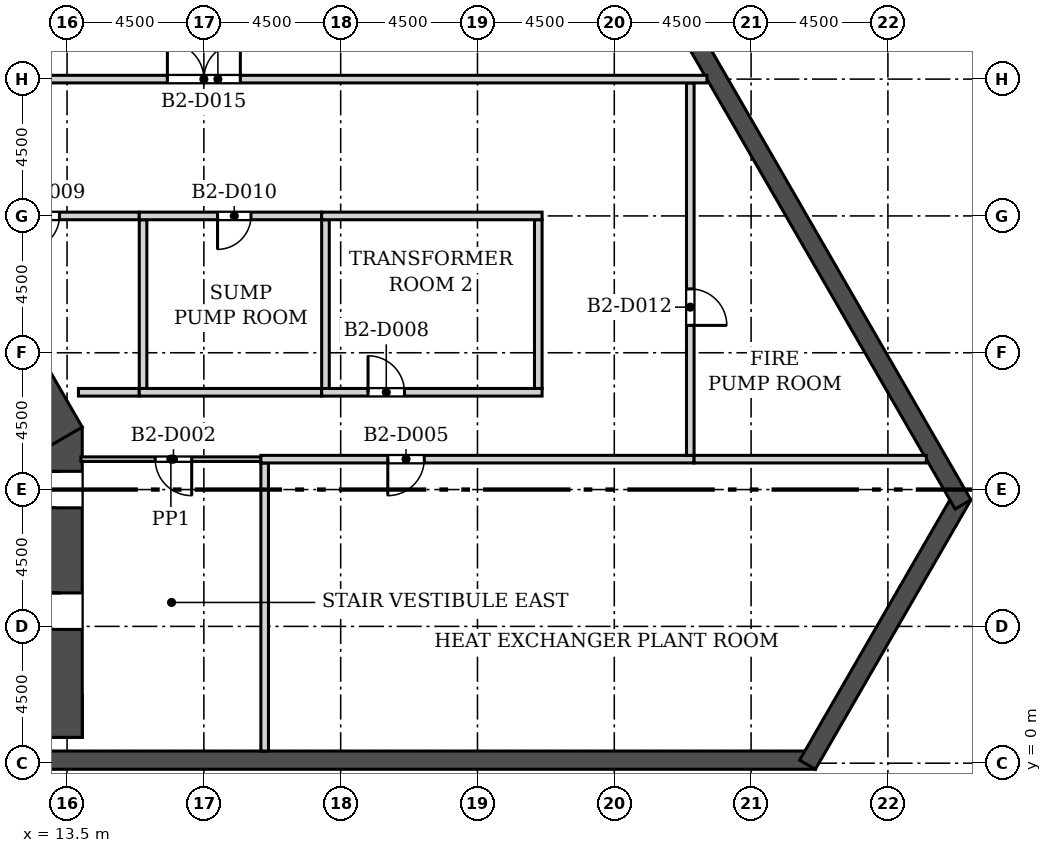
"""IFC4 building model, lengths in metres.
Left out: names, types, materials, properties, quantities, classifications, styles, units other than length and angle.
Written with IfcOpenShell. Run it as: python <this file> out.ifc"""

import sys

from ifc_helpers import new_model, si_unit, direction, frame, frame_2d, origin, place, context, subcontext, project, spatial, rectangle, extrude, element, fill, save


model = new_model("IFC4")
c1 = context("Model", 3, precision=1e-05, world=origin(), true_north=direction((0.0, 1.0)))
c2 = subcontext(c1, "Body", "Model", "MODEL_VIEW")
j1 = project(units=[si_unit("LENGTHUNIT", "METRE"), si_unit("PLANEANGLEUNIT", "RADIAN")], contexts=[c1])
p1 = place(None, origin())
s1 = spatial("IfcSite", under=j1, at=p1, CompositionType="ELEMENT")
p2 = place(p1, origin())
s2 = spatial("IfcBuilding", under=s1, at=p2, CompositionType="ELEMENT")
p3 = place(p2, frame((0.0, 0.0, -14.0)))
s3 = spatial("IfcBuildingStorey", under=s2, at=p3, CompositionType="ELEMENT", Elevation=-14.0)
p4 = place(p3, frame((-38.115, 0.1, -0.4), z_axis=(0.0, 0.0, 1.0), x_axis=(1.0, 0.0, 0.0)))
e1 = element("IfcWall", 1, at=p4, inside=s3, PredefinedType="SOLIDWALL", context=c2, shape_type="SweptSolid", body=[
    extrude(rectangle(XDim=76.231, YDim=0.6, at=frame_2d((38.115, 0.0))), origin(), (0.0, 0.0, 1.0), 6.4),
])
p5 = place(p3, frame((37.856, -0.05, -0.4), z_axis=(0.0, 0.0, 1.0), x_axis=(0.499996492717, 0.866027428706, 0.0)))
e2 = element("IfcWall", 2, at=p5, inside=s3, PredefinedType="SOLIDWALL", context=c2, shape_type="SweptSolid", body=[
    extrude(rectangle(XDim=10.231, YDim=0.6, at=frame_2d((5.115, 0.0))), origin(), (0.0, 0.0, 1.0), 6.4),
])
p6 = place(p3, frame((42.971, 8.51, -0.4), z_axis=(0.0, 0.0, 1.0), x_axis=(-0.499999312333, 0.866025800809, 0.0)))
e3 = element("IfcWall", 3, at=p6, inside=s3, PredefinedType="SOLIDWALL", context=c2, shape_type="SweptSolid", body=[
    extrude(rectangle(XDim=76.231, YDim=0.6, at=frame_2d((38.115, 0.0))), origin(), (0.0, 0.0, 1.0), 6.4),
])
p7 = place(p3, frame((-14.0, 1.55, 0.0), z_axis=(0.0, 0.0, 1.0), x_axis=(1.0, 0.0, 0.0)))
e4 = element("IfcWall", 4, at=p7, inside=s3, PredefinedType="SHEAR", context=c2, shape_type="SweptSolid", body=[
    extrude(rectangle(XDim=28.0, YDim=1.4, at=frame_2d((14.0, 0.0))), origin(), (0.0, 0.0, 1.0), 6.0),
])
p8 = place(p3, frame((13.3, 0.85, 0.0), z_axis=(0.0, 0.0, 1.0), x_axis=(0.0, 1.0, 0.0)))
e5 = element("IfcWall", 5, at=p8, inside=s3, PredefinedType="SHEAR", context=c2, shape_type="SweptSolid", body=[
    extrude(rectangle(XDim=10.202, YDim=1.4, at=frame_2d((5.101, 0.0))), origin(), (0.0, 0.0, 1.0), 6.0),
])
p9 = place(p8, frame((3.55, 0.0, 0.0)))
e6 = element("IfcOpeningElement", 6, at=p9, cuts=e5, PredefinedType="OPENING", context=c2, shape_type="SweptSolid", body=[
    extrude(rectangle(XDim=1.2, YDim=2.1, at=frame_2d((0.6, 1.05))), frame((0.0, 0.71, 0.0), z_axis=(0.0, -1.0, 0.0), x_axis=(1.0, 0.0, 0.0)), (0.0, 0.0, 1.0), 1.42),
])
p10 = place(p8, frame((7.55, 0.0, 0.0)))
e7 = element("IfcOpeningElement", 7, at=p10, cuts=e5, PredefinedType="OPENING", context=c2, shape_type="SweptSolid", body=[
    extrude(rectangle(XDim=1.2, YDim=2.1, at=frame_2d((0.6, 1.05))), frame((0.0, 0.71, 0.0), z_axis=(0.0, -1.0, 0.0), x_axis=(1.0, 0.0, 0.0)), (0.0, 0.0, 1.0), 1.42),
])
p11 = place(p3, frame((13.394, 10.703, 0.0), z_axis=(0.0, 0.0, 1.0), x_axis=(-0.50000187635, 0.866024320471, 0.0)))
e8 = element("IfcWall", 8, at=p11, inside=s3, PredefinedType="SHEAR", context=c2, shape_type="SweptSolid", body=[
    extrude(rectangle(XDim=9.177, YDim=1.4, at=frame_2d((4.588, 0.0))), origin(), (0.0, 0.0, 1.0), 6.0),
])
p12 = place(p3, frame((20.0, 9.875, 0.0), z_axis=(0.0, 0.0, 1.0), x_axis=(0.0, -1.0, 0.0)))
e9 = element("IfcWall", 9, at=p12, inside=s3, PredefinedType="SOLIDWALL", context=c2, shape_type="SweptSolid", body=[
    extrude(rectangle(XDim=9.475, YDim=0.25, at=frame_2d((4.738, 0.0))), origin(), (0.0, 0.0, 1.0), 5.65),
])
p13 = place(p3, frame((13.955, 10.0, 0.0), z_axis=(0.0, 0.0, 1.0), x_axis=(1.0, 0.0, 0.0)))
e10 = element("IfcWall", 10, at=p13, inside=s3, PredefinedType="PARTITIONING", context=c2, shape_type="SweptSolid", body=[
    extrude(rectangle(XDim=5.92, YDim=0.15, at=frame_2d((2.96, 0.0))), origin(), (0.0, 0.0, 1.0), 5.65),
])
p14 = place(p13, frame((2.445, 0.0, 0.0)))
e11 = element("IfcOpeningElement", 11, at=p14, cuts=e10, PredefinedType="OPENING", context=c2, shape_type="SweptSolid", body=[
    extrude(rectangle(XDim=1.2, YDim=2.1, at=frame_2d((0.6, 1.05))), frame((0.0, 0.085, 0.0), z_axis=(0.0, -1.0, 0.0), x_axis=(1.0, 0.0, 0.0)), (0.0, 0.0, 1.0), 0.17),
])
p15 = place(p3, frame((34.125, 10.0, 0.0), z_axis=(0.0, 0.0, 1.0), x_axis=(-1.0, 0.0, 0.0)))
e12 = element("IfcWall", 12, at=p15, inside=s3, PredefinedType="SOLIDWALL", context=c2, shape_type="SweptSolid", body=[
    extrude(rectangle(XDim=14.25, YDim=0.25, at=frame_2d((7.125, 0.0))), origin(), (0.0, 0.0, 1.0), 5.65),
])
p16 = place(p15, frame((8.875, 0.0, 0.0)))
e13 = element("IfcOpeningElement", 13, at=p16, cuts=e12, PredefinedType="OPENING", context=c2, shape_type="SweptSolid", body=[
    extrude(rectangle(XDim=1.2, YDim=2.1, at=frame_2d((0.6, 1.05))), frame((0.0, 0.135, 0.0), z_axis=(0.0, -1.0, 0.0), x_axis=(1.0, 0.0, 0.0)), (0.0, 0.0, 1.0), 0.27),
])
p17 = place(p3, frame((34.125, 10.0, 0.0), z_axis=(0.0, 0.0, 1.0), x_axis=(1.0, 0.0, 0.0)))
e14 = element("IfcWall", 14, at=p17, inside=s3, PredefinedType="SOLIDWALL", context=c2, shape_type="SweptSolid", body=[
    extrude(rectangle(XDim=7.64, YDim=0.25, at=frame_2d((3.82, 0.0))), origin(), (0.0, 0.0, 1.0), 5.65),
])
p18 = place(p3, frame((13.875, 12.2, 0.0), z_axis=(0.0, 0.0, 1.0), x_axis=(1.0, 0.0, 0.0)))
e15 = element("IfcWall", 15, at=p18, inside=s3, PredefinedType="SOLIDWALL", context=c2, shape_type="SweptSolid", body=[
    extrude(rectangle(XDim=2.0, YDim=0.25, at=frame_2d((1.0, 0.0))), origin(), (0.0, 0.0, 1.0), 5.65),
])
p19 = place(p3, frame((15.875, 12.2, 0.0), z_axis=(0.0, 0.0, 1.0), x_axis=(1.0, 0.0, 0.0)))
e16 = element("IfcWall", 16, at=p19, inside=s3, PredefinedType="SOLIDWALL", context=c2, shape_type="SweptSolid", body=[
    extrude(rectangle(XDim=6.0, YDim=0.25, at=frame_2d((3.0, 0.0))), origin(), (0.0, 0.0, 1.0), 5.65),
])
p20 = place(p3, frame((21.875, 12.2, 0.0), z_axis=(0.0, 0.0, 1.0), x_axis=(1.0, 0.0, 0.0)))
e17 = element("IfcWall", 17, at=p20, inside=s3, PredefinedType="SOLIDWALL", context=c2, shape_type="SweptSolid", body=[
    extrude(rectangle(XDim=7.25, YDim=0.25, at=frame_2d((3.625, 0.0))), origin(), (0.0, 0.0, 1.0), 5.65),
])
p21 = place(p20, frame((1.525, 0.0, 0.0)))
e18 = element("IfcOpeningElement", 18, at=p21, cuts=e17, PredefinedType="OPENING", context=c2, shape_type="SweptSolid", body=[
    extrude(rectangle(XDim=1.2, YDim=2.1, at=frame_2d((0.6, 1.05))), frame((0.0, 0.135, 0.0), z_axis=(0.0, -1.0, 0.0), x_axis=(1.0, 0.0, 0.0)), (0.0, 0.0, 1.0), 0.27),
])
for number, where, z_axis, x_axis in (
    (19, (22.0, 12.325, 0.0), (0.0, 0.0, 1.0), (0.0, 1.0, 0.0)),
    (20, (29.0, 12.325, 0.0), (0.0, 0.0, 1.0), (0.0, 1.0, 0.0)),
    (21, (16.0, 17.875, 0.0), (0.0, 0.0, 1.0), (0.0, -1.0, 0.0)),
):
    element("IfcWall", number, at=place(p3, frame(where, z_axis=z_axis, x_axis=x_axis)), inside=s3, PredefinedType="SOLIDWALL", context=c2, shape_type="SweptSolid", body=[
        extrude(rectangle(XDim=5.55, YDim=0.25, at=frame_2d((2.775, 0.0))), origin(), (0.0, 0.0, 1.0), 5.65),
    ])
p22 = place(p3, frame((15.875, 18.0, 0.0), z_axis=(0.0, 0.0, 1.0), x_axis=(-1.0, 0.0, 0.0)))
e22 = element("IfcWall", 22, at=p22, inside=s3, PredefinedType="SOLIDWALL", context=c2, shape_type="SweptSolid", body=[
    extrude(rectangle(XDim=5.977, YDim=0.25, at=frame_2d((2.988, 0.0))), origin(), (0.0, 0.0, 1.0), 5.65),
])
p23 = place(p22, frame((2.625, 0.0, 0.0)))
e23 = element("IfcOpeningElement", 23, at=p23, cuts=e22, PredefinedType="OPENING", context=c2, shape_type="SweptSolid", body=[
    extrude(rectangle(XDim=1.1, YDim=2.1, at=frame_2d((0.55, 1.05))), frame((0.0, 0.135, 0.0), z_axis=(0.0, -1.0, 0.0), x_axis=(1.0, 0.0, 0.0)), (0.0, 0.0, 1.0), 0.27),
])
p24 = place(p3, frame((21.875, 18.0, 0.0), z_axis=(0.0, 0.0, 1.0), x_axis=(-1.0, 0.0, 0.0)))
e24 = element("IfcWall", 24, at=p24, inside=s3, PredefinedType="SOLIDWALL", context=c2, shape_type="SweptSolid", body=[
    extrude(rectangle(XDim=6.0, YDim=0.25, at=frame_2d((3.0, 0.0))), origin(), (0.0, 0.0, 1.0), 5.65),
])
p25 = place(p24, frame((2.325, 0.0, 0.0)))
e25 = element("IfcOpeningElement", 25, at=p25, cuts=e24, PredefinedType="OPENING", context=c2, shape_type="SweptSolid", body=[
    extrude(rectangle(XDim=1.1, YDim=2.1, at=frame_2d((0.55, 1.05))), frame((0.0, 0.135, 0.0), z_axis=(0.0, -1.0, 0.0), x_axis=(1.0, 0.0, 0.0)), (0.0, 0.0, 1.0), 0.27),
])
p26 = place(p3, frame((29.125, 18.0, 0.0), z_axis=(0.0, 0.0, 1.0), x_axis=(-1.0, 0.0, 0.0)))
e26 = element("IfcWall", 26, at=p26, inside=s3, PredefinedType="SOLIDWALL", context=c2, shape_type="SweptSolid", body=[
    extrude(rectangle(XDim=7.25, YDim=0.25, at=frame_2d((3.625, 0.0))), origin(), (0.0, 0.0, 1.0), 5.65),
])
p27 = place(p3, frame((34.0, 22.375, 0.0), z_axis=(0.0, 0.0, 1.0), x_axis=(0.0, -1.0, 0.0)))
e27 = element("IfcWall", 27, at=p27, inside=s3, PredefinedType="SOLIDWALL", context=c2, shape_type="SweptSolid", body=[
    extrude(rectangle(XDim=12.25, YDim=0.25, at=frame_2d((6.125, 0.0))), origin(), (0.0, 0.0, 1.0), 5.65),
])
p28 = place(p27, frame((6.775, 0.0, 0.0)))
e28 = element("IfcOpeningElement", 28, at=p28, cuts=e27, PredefinedType="OPENING", context=c2, shape_type="SweptSolid", body=[
    extrude(rectangle(XDim=1.2, YDim=2.1, at=frame_2d((0.6, 1.05))), frame((0.0, 0.135, 0.0), z_axis=(0.0, -1.0, 0.0), x_axis=(1.0, 0.0, 0.0)), (0.0, 0.0, 1.0), 0.27),
])
p29 = place(p3, frame((2.375, 22.5, 0.0), z_axis=(0.0, 0.0, 1.0), x_axis=(1.0, 0.0, 0.0)))
e29 = element("IfcWall", 29, at=p29, inside=s3, PredefinedType="SOLIDWALL", context=c2, shape_type="SweptSolid", body=[
    extrude(rectangle(XDim=32.173, YDim=0.25, at=frame_2d((16.086, 0.0))), origin(), (0.0, 0.0, 1.0), 5.65),
])
p30 = place(p29, frame((14.425, 0.0, 0.0)))
e30 = element("IfcOpeningElement", 30, at=p30, cuts=e29, PredefinedType="OPENING", context=c2, shape_type="SweptSolid", body=[
    extrude(rectangle(XDim=2.4, YDim=2.4, at=frame_2d((1.2, 1.2))), frame((0.0, 0.135, 0.0), z_axis=(0.0, -1.0, 0.0), x_axis=(1.0, 0.0, 0.0)), (0.0, 0.0, 1.0), 0.27),
])
p31 = place(p9, origin())
e31 = element("IfcDoor", 31, at=p31, inside=s3, OperationType="SINGLE_SWING_RIGHT", PredefinedType="DOOR", context=c2, shape_type="SweptSolid", body=[
    extrude(rectangle(XDim=1.2, YDim=2.1, at=frame_2d((0.6, 1.05))), frame((0.0, 0.025, 0.0), z_axis=(0.0, -1.0, 0.0), x_axis=(1.0, 0.0, 0.0)), (0.0, 0.0, 1.0), 0.05),
])
fill(e6, e31)
p32 = place(p10, origin())
e32 = element("IfcDoor", 32, at=p32, inside=s3, OperationType="SINGLE_SWING_RIGHT", PredefinedType="DOOR", context=c2, shape_type="SweptSolid", body=[
    extrude(rectangle(XDim=1.2, YDim=2.1, at=frame_2d((0.6, 1.05))), frame((0.0, 0.025, 0.0), z_axis=(0.0, -1.0, 0.0), x_axis=(1.0, 0.0, 0.0)), (0.0, 0.0, 1.0), 0.05),
])
fill(e7, e32)
p33 = place(p14, frame((1.2, 0.0, 0.0), z_axis=(0.0, 0.0, 1.0), x_axis=(-1.0, 0.0, 0.0)))
e33 = element("IfcDoor", 33, at=p33, inside=s3, OperationType="SINGLE_SWING_LEFT", PredefinedType="DOOR", context=c2, shape_type="SweptSolid", body=[
    extrude(rectangle(XDim=1.2, YDim=2.1, at=frame_2d((0.6, 1.05))), frame((0.0, 0.025, 0.0), z_axis=(0.0, -1.0, 0.0), x_axis=(1.0, 0.0, 0.0)), (0.0, 0.0, 1.0), 0.05),
])
fill(e11, e33)
p34 = place(p16, origin())
e34 = element("IfcDoor", 34, at=p34, inside=s3, OperationType="SINGLE_SWING_RIGHT", PredefinedType="DOOR", context=c2, shape_type="SweptSolid", body=[
    extrude(rectangle(XDim=1.2, YDim=2.1, at=frame_2d((0.6, 1.05))), frame((0.0, 0.025, 0.0), z_axis=(0.0, -1.0, 0.0), x_axis=(1.0, 0.0, 0.0)), (0.0, 0.0, 1.0), 0.05),
])
fill(e13, e34)
p35 = place(p21, origin())
e35 = element("IfcDoor", 35, at=p35, inside=s3, OperationType="SINGLE_SWING_LEFT", PredefinedType="DOOR", context=c2, shape_type="SweptSolid", body=[
    extrude(rectangle(XDim=1.2, YDim=2.1, at=frame_2d((0.6, 1.05))), frame((0.0, 0.025, 0.0), z_axis=(0.0, -1.0, 0.0), x_axis=(1.0, 0.0, 0.0)), (0.0, 0.0, 1.0), 0.05),
])
fill(e18, e35)
p36 = place(p23, origin())
e36 = element("IfcDoor", 36, at=p36, inside=s3, OperationType="SINGLE_SWING_RIGHT", PredefinedType="DOOR", context=c2, shape_type="SweptSolid", body=[
    extrude(rectangle(XDim=1.1, YDim=2.1, at=frame_2d((0.55, 1.05))), frame((0.0, 0.025, 0.0), z_axis=(0.0, -1.0, 0.0), x_axis=(1.0, 0.0, 0.0)), (0.0, 0.0, 1.0), 0.05),
])
fill(e23, e36)
p37 = place(p25, origin())
e37 = element("IfcDoor", 37, at=p37, inside=s3, OperationType="SINGLE_SWING_RIGHT", PredefinedType="DOOR", context=c2, shape_type="SweptSolid", body=[
    extrude(rectangle(XDim=1.1, YDim=2.1, at=frame_2d((0.55, 1.05))), frame((0.0, 0.025, 0.0), z_axis=(0.0, -1.0, 0.0), x_axis=(1.0, 0.0, 0.0)), (0.0, 0.0, 1.0), 0.05),
])
fill(e25, e37)
p38 = place(p28, origin())
e38 = element("IfcDoor", 38, at=p38, inside=s3, OperationType="SINGLE_SWING_RIGHT", PredefinedType="DOOR", context=c2, shape_type="SweptSolid", body=[
    extrude(rectangle(XDim=1.2, YDim=2.1, at=frame_2d((0.6, 1.05))), frame((0.0, 0.025, 0.0), z_axis=(0.0, -1.0, 0.0), x_axis=(1.0, 0.0, 0.0)), (0.0, 0.0, 1.0), 0.05),
])
fill(e28, e38)
p39 = place(p30, origin())
e39 = element("IfcDoor", 39, at=p39, inside=s3, OperationType="DOUBLE_DOOR_SINGLE_SWING", PredefinedType="DOOR", context=c2, shape_type="SweptSolid", body=[
    extrude(rectangle(XDim=2.4, YDim=2.4, at=frame_2d((1.2, 1.2))), frame((0.0, 0.025, 0.0), z_axis=(0.0, -1.0, 0.0), x_axis=(1.0, 0.0, 0.0)), (0.0, 0.0, 1.0), 0.05),
])
fill(e30, e39)
save(model, sys.argv[1])
